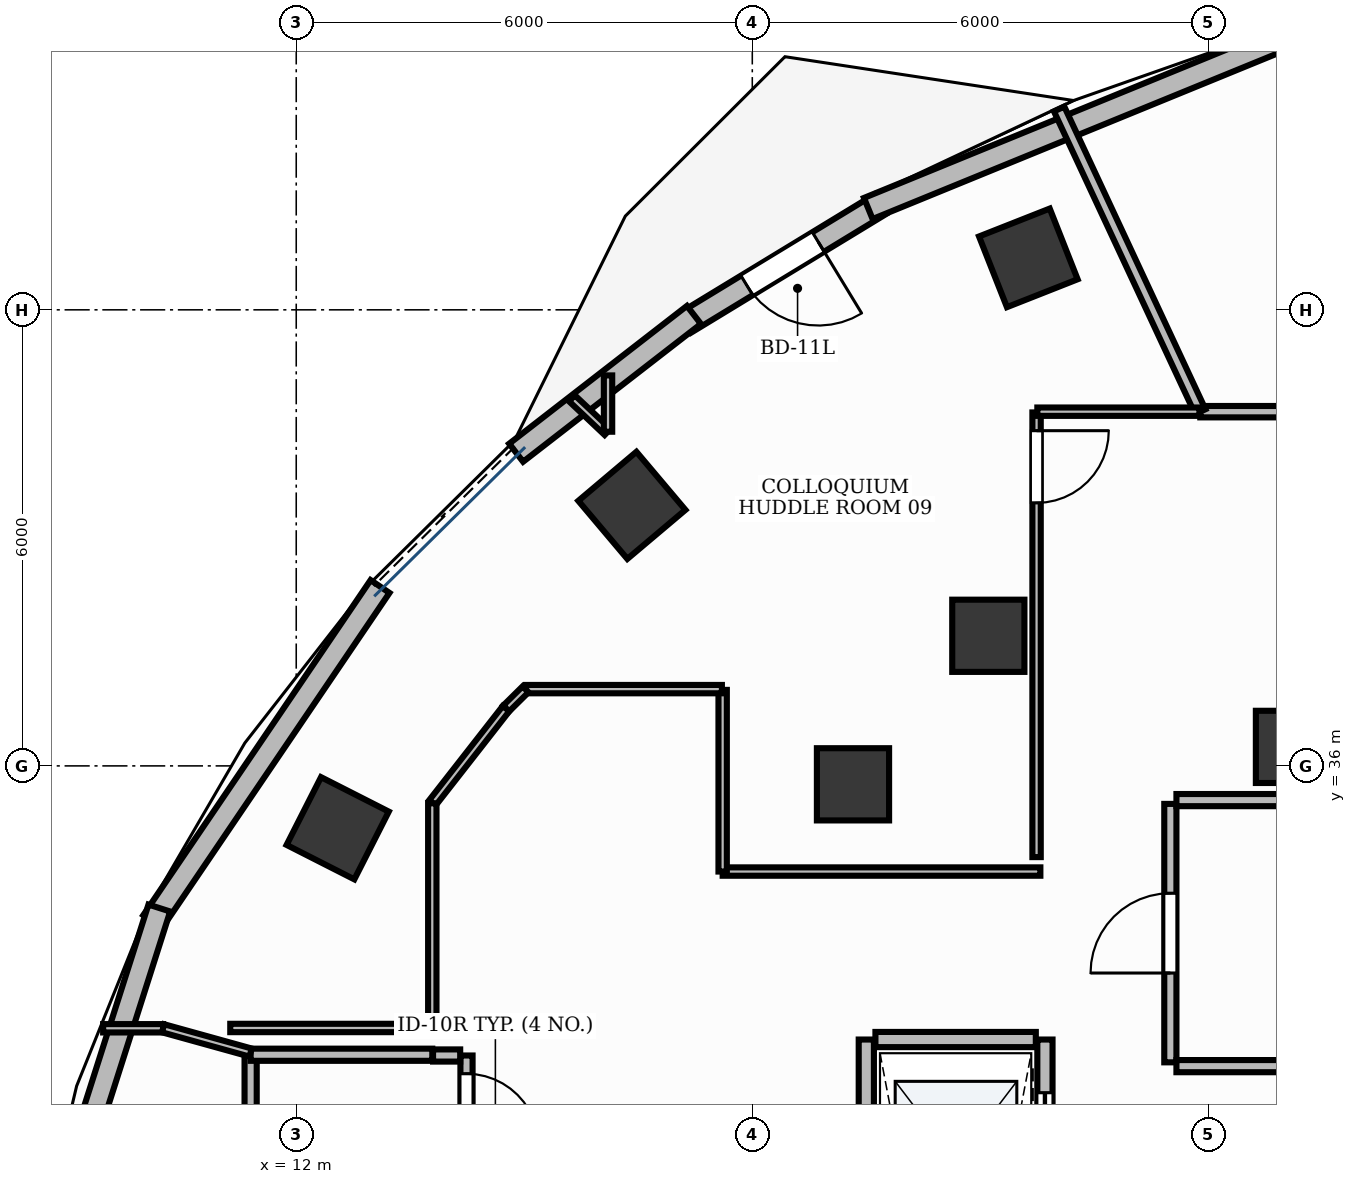
"""IFC4 building model, lengths in metres.
Left out: names, types, materials, properties, quantities, classifications, styles, units other than length and angle.
Written with IfcOpenShell. Run it as: python <this file> out.ifc"""

import sys

from ifc_helpers import new_model, si_unit, direction, frame, frame_2d, origin, origin_2d, place, context, subcontext, project, spatial, rectangle, extrude, element, fill, save


model = new_model("IFC4")
c1 = context("Model", 3, precision=1e-05, world=origin(), true_north=direction((0.0, 1.0)))
c2 = subcontext(c1, "Body", "Model", "MODEL_VIEW")
j1 = project(units=[si_unit("LENGTHUNIT", "METRE"), si_unit("PLANEANGLEUNIT", "RADIAN")], contexts=[c1])
p1 = place(None, origin())
s1 = spatial("IfcSite", under=j1, at=p1, CompositionType="ELEMENT")
p2 = place(p1, origin())
s2 = spatial("IfcBuilding", under=s1, at=p2, CompositionType="ELEMENT")
p3 = place(p2, frame((0.0, 0.0, 208.8)))
s3 = spatial("IfcBuildingStorey", under=s2, at=p3, CompositionType="ELEMENT", Elevation=208.8)
p4 = place(p3, frame((25.1, 36.25, -0.0), z_axis=(0.0, 0.0, 1.0), x_axis=(1.0, 0.0, 0.0)))
e1 = element("IfcColumn", 1, at=p4, inside=s3, PredefinedType="PILASTER", context=c2, shape_type="SweptSolid", body=[
    extrude(rectangle(XDim=0.95, YDim=0.95, at=origin_2d()), origin(), (0.0, 0.0, 1.0), 3.881),
])
for number, where, z_axis, x_axis in (
    (2, (21.632, 42.684, -0.0), (0.0, 0.0, 1.0), (0.93, 0.367, 0.0)),
    (3, (16.416, 39.427, -0.0), (0.0, 0.0, 1.0), (0.764, 0.645, 0.0)),
):
    element("IfcColumn", number, at=place(p3, frame(where, z_axis=z_axis, x_axis=x_axis)), inside=s3, PredefinedType="COLUMN", context=c2, shape_type="SweptSolid", body=[
        extrude(rectangle(XDim=1.0, YDim=1.0, at=origin_2d()), origin(), (0.0, 0.0, 1.0), 3.881),
    ])
p5 = place(p3, frame((21.105, 37.712, -0.0), z_axis=(0.0, 0.0, 1.0), x_axis=(1.0, 0.0, 0.0)))
e4 = element("IfcColumn", 4, at=p5, inside=s3, PredefinedType="COLUMN", context=c2, shape_type="SweptSolid", body=[
    extrude(rectangle(XDim=0.95, YDim=0.95, at=origin_2d()), origin(), (0.0, 0.0, 1.0), 3.881),
])
p6 = place(p3, frame((12.545, 35.18, -0.0), z_axis=(0.0, 0.0, 1.0), x_axis=(0.453057191132, 0.891481453292, 0.0)))
e5 = element("IfcColumn", 5, at=p6, inside=s3, PredefinedType="COLUMN", context=c2, shape_type="SweptSolid", body=[
    extrude(rectangle(XDim=1.0, YDim=1.0, at=origin_2d()), origin(), (0.0, 0.0, 1.0), 3.881),
])
p7 = place(p3, frame((19.325, 35.758, -0.0), z_axis=(0.0, 0.0, 1.0), x_axis=(1.0, 0.0, 0.0)))
e6 = element("IfcColumn", 6, at=p7, inside=s3, PredefinedType="COLUMN", context=c2, shape_type="SweptSolid", body=[
    extrude(rectangle(XDim=0.95, YDim=0.95, at=origin_2d()), origin(), (0.0, 0.0, 1.0), 3.881),
])
p8 = place(p3, frame((19.681, 43.388, 0.0), z_axis=(0.0, 0.0, 1.0), x_axis=(-0.854364873812, -0.519673611411, 0.0)))
e7 = element("IfcWall", 7, at=p8, inside=s3, PredefinedType="STANDARD", context=c2, shape_type="SweptSolid", body=[
    extrude(rectangle(XDim=3.004, YDim=0.3, at=frame_2d((1.502, 0.0))), origin(), (0.0, 0.0, 1.0), 3.88),
])
p9 = place(p8, frame((0.952, 0.0, 0.0)))
e8 = element("IfcOpeningElement", 8, at=p9, cuts=e7, PredefinedType="OPENING", context=c2, shape_type="SweptSolid", body=[
    extrude(rectangle(XDim=1.1, YDim=2.15, at=frame_2d((0.55, 1.075))), frame((0.0, 0.165, 0.0), z_axis=(0.0, -1.0, 0.0), x_axis=(1.0, 0.0, 0.0)), (0.0, 0.0, 1.0), 0.33),
])
p10 = place(p3, frame((25.21, 45.658, 0.0), z_axis=(0.0, 0.0, 1.0), x_axis=(-0.925564684887, -0.37858950605, 0.0)))
e9 = element("IfcWall", 9, at=p10, inside=s3, PredefinedType="STANDARD", context=c2, shape_type="SweptSolid", body=[
    extrude(rectangle(XDim=6.142, YDim=0.3, at=frame_2d((3.071, 0.0))), origin(), (0.0, 0.0, 1.0), 2.205),
])
p11 = place(p3, frame((17.232, 41.933, 0.0), z_axis=(0.0, 0.0, 1.0), x_axis=(-0.790315182738, -0.612700507536, 0.0)))
e10 = element("IfcWall", 10, at=p11, inside=s3, PredefinedType="STANDARD", context=c2, shape_type="SweptSolid", body=[
    extrude(rectangle(XDim=2.959, YDim=0.3, at=frame_2d((1.48, 0.0))), origin(), (0.0, 0.0, 1.0), 2.205),
])
p12 = place(p3, frame((13.103, 38.36, 0.0), z_axis=(0.0, 0.0, 1.0), x_axis=(-0.561387104339, -0.827553333074, 0.0)))
e11 = element("IfcWall", 11, at=p12, inside=s3, PredefinedType="STANDARD", context=c2, shape_type="SweptSolid", body=[
    extrude(rectangle(XDim=5.327, YDim=0.3, at=frame_2d((2.664, 0.0))), origin(), (0.0, 0.0, 1.0), 2.205),
])
p13 = place(p3, frame((10.198, 34.13, 0.0), z_axis=(0.0, 0.0, 1.0), x_axis=(-0.30372166002, -0.952760805887, 0.0)))
e12 = element("IfcWall", 12, at=p13, inside=s3, PredefinedType="STANDARD", context=c2, shape_type="SweptSolid", body=[
    extrude(rectangle(XDim=5.077, YDim=0.3, at=frame_2d((2.539, 0.0))), origin(), (0.0, 0.0, 1.0), 3.88),
])
p14 = place(p3, frame((19.5, 21.6, 0.0), z_axis=(0.0, 0.0, 1.0), x_axis=(0.0, 1.0, 0.0)))
e13 = element("IfcWall", 13, at=p14, inside=s3, PredefinedType="PARTITIONING", context=c2, shape_type="SweptSolid", body=[
    extrude(rectangle(XDim=10.8, YDim=0.2, at=frame_2d((5.4, 0.0))), origin(), (0.0, 0.0, 1.0), 2.22),
])
p15 = place(p3, frame((21.85, 21.6, 0.0), z_axis=(0.0, 0.0, 1.0), x_axis=(0.0, 1.0, 0.0)))
e14 = element("IfcWall", 14, at=p15, inside=s3, PredefinedType="PARTITIONING", context=c2, shape_type="SweptSolid", body=[
    extrude(rectangle(XDim=10.8, YDim=0.2, at=frame_2d((5.4, 0.0))), origin(), (0.0, 0.0, 1.0), 2.22),
])
p16 = place(p15, frame((0.9, 0.0, 0.0)))
e15 = element("IfcOpeningElement", 15, at=p16, cuts=e14, PredefinedType="OPENING", context=c2, shape_type="SweptSolid", body=[
    extrude(rectangle(XDim=1.1, YDim=2.2, at=frame_2d((0.55, 1.1))), frame((0.0, 0.115, 0.0), z_axis=(0.0, -1.0, 0.0), x_axis=(1.0, 0.0, 0.0)), (0.0, 0.0, 1.0), 0.23),
])
p17 = place(p15, frame((3.6, 0.0, 0.0)))
e16 = element("IfcOpeningElement", 16, at=p17, cuts=e14, PredefinedType="OPENING", context=c2, shape_type="SweptSolid", body=[
    extrude(rectangle(XDim=1.1, YDim=2.2, at=frame_2d((0.55, 1.1))), frame((0.0, 0.115, 0.0), z_axis=(0.0, -1.0, 0.0), x_axis=(1.0, 0.0, 0.0)), (0.0, 0.0, 1.0), 0.23),
])
p18 = place(p15, frame((6.3, 0.0, 0.0)))
e17 = element("IfcOpeningElement", 17, at=p18, cuts=e14, PredefinedType="OPENING", context=c2, shape_type="SweptSolid", body=[
    extrude(rectangle(XDim=1.1, YDim=2.2, at=frame_2d((0.55, 1.1))), frame((0.0, 0.115, 0.0), z_axis=(0.0, -1.0, 0.0), x_axis=(1.0, 0.0, 0.0)), (0.0, 0.0, 1.0), 0.23),
])
p19 = place(p15, frame((9.0, 0.0, 0.0)))
e18 = element("IfcOpeningElement", 18, at=p19, cuts=e14, PredefinedType="OPENING", context=c2, shape_type="SweptSolid", body=[
    extrude(rectangle(XDim=1.1, YDim=2.2, at=frame_2d((0.55, 1.1))), frame((0.0, 0.115, 0.0), z_axis=(0.0, -1.0, 0.0), x_axis=(1.0, 0.0, 0.0)), (0.0, 0.0, 1.0), 0.23),
])
p20 = place(p3, frame((19.62, 32.4, 0.0), z_axis=(0.0, 0.0, 1.0), x_axis=(1.0, 0.0, 0.0)))
e19 = element("IfcWall", 19, at=p20, inside=s3, PredefinedType="PARTITIONING", context=c2, shape_type="SweptSolid", body=[
    extrude(rectangle(XDim=2.11, YDim=0.2, at=frame_2d((1.055, 0.0))), origin(), (0.0, 0.0, 1.0), 2.22),
])
p21 = place(p3, frame((23.5, 32.1, 0.0), z_axis=(0.0, 0.0, 1.0), x_axis=(0.0, 1.0, 0.0)))
e20 = element("IfcWall", 20, at=p21, inside=s3, PredefinedType="PARTITIONING", context=c2, shape_type="SweptSolid", body=[
    extrude(rectangle(XDim=3.4, YDim=0.16, at=frame_2d((1.7, 0.0))), origin(), (0.0, 0.0, 1.0), 2.22),
])
p22 = place(p21, frame((1.175, 0.0, 0.0)))
e21 = element("IfcOpeningElement", 21, at=p22, cuts=e20, PredefinedType="OPENING", context=c2, shape_type="SweptSolid", body=[
    extrude(rectangle(XDim=1.05, YDim=2.15, at=frame_2d((0.525, 1.075))), frame((0.0, 0.095, 0.0), z_axis=(0.0, -1.0, 0.0), x_axis=(1.0, 0.0, 0.0)), (0.0, 0.0, 1.0), 0.19),
])
p23 = place(p3, frame((23.58, 32.05, 0.0), z_axis=(0.0, 0.0, 1.0), x_axis=(1.0, 0.0, 0.0)))
e22 = element("IfcWall", 22, at=p23, inside=s3, PredefinedType="PARTITIONING", context=c2, shape_type="SweptSolid", body=[
    extrude(rectangle(XDim=4.97, YDim=0.16, at=frame_2d((2.485, 0.0))), origin(), (0.0, 0.0, 1.0), 2.22),
])
p24 = place(p3, frame((23.58, 35.55, 0.0), z_axis=(0.0, 0.0, 1.0), x_axis=(1.0, 0.0, 0.0)))
e23 = element("IfcWall", 23, at=p24, inside=s3, PredefinedType="PARTITIONING", context=c2, shape_type="SweptSolid", body=[
    extrude(rectangle(XDim=2.12, YDim=0.16, at=frame_2d((1.06, 0.0))), origin(), (0.0, 0.0, 1.0), 2.22),
])
p25 = place(p3, frame((14.24, 32.19, 0.0), z_axis=(0.0, 0.0, 1.0), x_axis=(0.0, -1.0, 0.0)))
e24 = element("IfcWall", 24, at=p25, inside=s3, PredefinedType="PARTITIONING", context=c2, shape_type="SweptSolid", body=[
    extrude(rectangle(XDim=4.99, YDim=0.16, at=frame_2d((2.495, 0.0))), origin(), (0.0, 0.0, 1.0), 2.22),
])
p26 = place(p25, frame((0.24, 0.0, 0.0)))
e25 = element("IfcOpeningElement", 25, at=p26, cuts=e24, PredefinedType="OPENING", context=c2, shape_type="SweptSolid", body=[
    extrude(rectangle(XDim=0.95, YDim=2.15, at=frame_2d((0.475, 1.075))), frame((0.0, 0.095, 0.0), z_axis=(0.0, -1.0, 0.0), x_axis=(1.0, 0.0, 0.0)), (0.0, 0.0, 1.0), 0.19),
])
p27 = place(p3, frame((33.692, 40.66, 0.0), z_axis=(0.0, 0.0, 1.0), x_axis=(-1.0, 0.0, 0.0)))
e26 = element("IfcWall", 26, at=p27, inside=s3, PredefinedType="PARTITIONING", context=c2, shape_type="SweptSolid", body=[
    extrude(rectangle(XDim=9.798, YDim=0.15, at=frame_2d((4.899, 0.0))), origin(), (0.0, 0.0, 1.0), 2.22),
])
p28 = place(p27, frame((0.24, 0.0, 0.0)))
e27 = element("IfcOpeningElement", 27, at=p28, cuts=e26, PredefinedType="OPENING", context=c2, shape_type="SweptSolid", body=[
    extrude(rectangle(XDim=0.95, YDim=2.15, at=frame_2d((0.475, 1.075))), frame((0.0, 0.09, 0.0), z_axis=(0.0, -1.0, 0.0), x_axis=(1.0, 0.0, 0.0)), (0.0, 0.0, 1.0), 0.18),
])
p29 = place(p3, frame((21.74, 40.65, 0.0), z_axis=(0.0, 0.0, 1.0), x_axis=(0.0, -1.0, 0.0)))
e28 = element("IfcWall", 28, at=p29, inside=s3, PredefinedType="MOVABLE", context=c2, shape_type="SweptSolid", body=[
    extrude(rectangle(XDim=5.85, YDim=0.11, at=frame_2d((2.925, 0.0))), origin(), (0.0, 0.0, 1.0), 2.22),
])
p30 = place(p29, frame((0.24, 0.0, 0.0)))
e29 = element("IfcOpeningElement", 29, at=p30, cuts=e28, PredefinedType="OPENING", context=c2, shape_type="SweptSolid", body=[
    extrude(rectangle(XDim=0.95, YDim=2.15, at=frame_2d((0.475, 1.075))), frame((0.0, 0.07, 0.0), z_axis=(0.0, -1.0, 0.0), x_axis=(1.0, 0.0, 0.0)), (0.0, 0.0, 1.0), 0.14),
])
p31 = place(p3, frame((13.8, 32.19, 0.0), z_axis=(0.0, 0.0, 1.0), x_axis=(1.0, 0.0, 0.0)))
e30 = element("IfcWall", 30, at=p31, inside=s3, PredefinedType="PARTITIONING", context=c2, shape_type="SweptSolid", body=[
    extrude(rectangle(XDim=0.357, YDim=0.16, at=frame_2d((0.178, 0.0))), origin(), (0.0, 0.0, 1.0), 2.22),
])
p32 = place(p3, frame((11.4, 27.2, 0.0), z_axis=(0.0, 0.0, 1.0), x_axis=(0.0, 1.0, 0.0)))
e31 = element("IfcWall", 31, at=p32, inside=s3, PredefinedType="PARTITIONING", context=c2, shape_type="SweptSolid", body=[
    extrude(rectangle(XDim=5.0, YDim=0.16, at=frame_2d((2.5, 0.0))), origin(), (0.0, 0.0, 1.0), 2.22),
])
p33 = place(p3, frame((11.4, 32.2, 0.0), z_axis=(0.0, 0.0, 1.0), x_axis=(1.0, 0.0, 0.0)))
e32 = element("IfcWall", 32, at=p33, inside=s3, PredefinedType="PARTITIONING", context=c2, shape_type="SweptSolid", body=[
    extrude(rectangle(XDim=2.39, YDim=0.16, at=frame_2d((1.195, 0.0))), origin(), (0.0, 0.0, 1.0), 2.22),
])
p34 = place(p3, frame((9.46, 32.548, 0.0), z_axis=(0.0, 0.0, 1.0), x_axis=(1.0, 0.0, 0.0)))
e33 = element("IfcWall", 33, at=p34, inside=s3, PredefinedType="MOVABLE", context=c2, shape_type="SweptSolid", body=[
    extrude(rectangle(XDim=0.789, YDim=0.11, at=frame_2d((0.394, 0.0))), origin(), (0.0, 0.0, 1.0), 2.22),
])
p35 = place(p3, frame((10.249, 32.548, 0.0), z_axis=(0.0, 0.0, 1.0), x_axis=(0.963570580791, -0.267454175203, 0.0)))
e34 = element("IfcWall", 34, at=p35, inside=s3, PredefinedType="MOVABLE", context=c2, shape_type="SweptSolid", body=[
    extrude(rectangle(XDim=1.195, YDim=0.11, at=frame_2d((0.597, 0.0))), origin(), (0.0, 0.0, 1.0), 2.22),
])
p36 = place(p3, frame((23.894, 40.66, 0.0), z_axis=(0.0, 0.0, 1.0), x_axis=(-0.422620807898, 0.90630659974, 0.0)))
e35 = element("IfcWall", 35, at=p36, inside=s3, PredefinedType="PARTITIONING", context=c2, shape_type="SweptSolid", body=[
    extrude(rectangle(XDim=4.394, YDim=0.15, at=frame_2d((2.197, 0.0))), origin(), (0.0, 0.0, 1.0), 2.22),
])
p37 = place(p3, frame((15.627, 40.836, 0.0), z_axis=(0.0, 0.0, 1.0), x_axis=(0.726519497239, -0.687145850698, 0.0)))
e36 = element("IfcWall", 36, at=p37, inside=s3, PredefinedType="MOVABLE", context=c2, shape_type="SweptSolid", body=[
    extrude(rectangle(XDim=0.645, YDim=0.11, at=frame_2d((0.322, 0.0))), origin(), (0.0, 0.0, 1.0), 2.22),
])
p38 = place(p3, frame((16.102, 40.396, 0.0), z_axis=(0.0, 0.0, 1.0), x_axis=(0.0, 1.0, 0.0)))
e37 = element("IfcWall", 37, at=p38, inside=s3, PredefinedType="MOVABLE", context=c2, shape_type="SweptSolid", body=[
    extrude(rectangle(XDim=0.741, YDim=0.11, at=frame_2d((0.371, 0.0))), origin(), (0.0, 0.0, 1.0), 2.22),
])
p39 = place(p3, frame((23.883, 40.66, 0.0), z_axis=(0.0, 0.0, 1.0), x_axis=(-1.0, 0.0, 0.0)))
e38 = element("IfcWall", 38, at=p39, inside=s3, PredefinedType="MOVABLE", context=c2, shape_type="SweptSolid", body=[
    extrude(rectangle(XDim=2.133, YDim=0.11, at=frame_2d((1.066, 0.0))), origin(), (0.0, 0.0, 1.0), 2.22),
])
p40 = place(p3, frame((21.79, 34.61, 0.0), z_axis=(0.0, 0.0, 1.0), x_axis=(-1.0, 0.0, 0.0)))
e39 = element("IfcWall", 39, at=p40, inside=s3, PredefinedType="MOVABLE", context=c2, shape_type="SweptSolid", body=[
    extrude(rectangle(XDim=4.18, YDim=0.11, at=frame_2d((2.09, 0.0))), origin(), (0.0, 0.0, 1.0), 2.22),
])
p41 = place(p3, frame((17.61, 34.61, 0.0), z_axis=(0.0, 0.0, 1.0), x_axis=(0.0, 1.0, 0.0)))
e40 = element("IfcWall", 40, at=p41, inside=s3, PredefinedType="MOVABLE", context=c2, shape_type="SweptSolid", body=[
    extrude(rectangle(XDim=2.39, YDim=0.11, at=frame_2d((1.195, 0.0))), origin(), (0.0, 0.0, 1.0), 2.22),
])
p42 = place(p3, frame((17.6, 37.01, 0.0), z_axis=(0.0, 0.0, 1.0), x_axis=(-1.0, 0.0, 0.0)))
e41 = element("IfcWall", 41, at=p42, inside=s3, PredefinedType="MOVABLE", context=c2, shape_type="SweptSolid", body=[
    extrude(rectangle(XDim=2.576, YDim=0.11, at=frame_2d((1.288, 0.0))), origin(), (0.0, 0.0, 1.0), 2.22),
])
p43 = place(p3, frame((15.017, 37.007, 0.0), z_axis=(0.0, 0.0, 1.0), x_axis=(-0.711174408111, -0.70301561949, 0.0)))
e42 = element("IfcWall", 42, at=p43, inside=s3, PredefinedType="MOVABLE", context=c2, shape_type="SweptSolid", body=[
    extrude(rectangle(XDim=0.359, YDim=0.11, at=frame_2d((0.18, 0.0))), origin(), (0.0, 0.0, 1.0), 2.22),
])
p44 = place(p3, frame((14.76, 36.754, 0.0), z_axis=(0.0, 0.0, 1.0), x_axis=(-0.615625972761, -0.788038489962, 0.0)))
e43 = element("IfcWall", 43, at=p44, inside=s3, PredefinedType="MOVABLE", context=c2, shape_type="SweptSolid", body=[
    extrude(rectangle(XDim=1.573, YDim=0.11, at=frame_2d((0.787, 0.0))), origin(), (0.0, 0.0, 1.0), 2.22),
])
p45 = place(p3, frame((13.79, 35.508, 0.0), z_axis=(0.0, 0.0, 1.0), x_axis=(0.0, -1.0, 0.0)))
e44 = element("IfcWall", 44, at=p45, inside=s3, PredefinedType="MOVABLE", context=c2, shape_type="SweptSolid", body=[
    extrude(rectangle(XDim=2.956, YDim=0.11, at=frame_2d((1.478, 0.0))), origin(), (0.0, 0.0, 1.0), 2.22),
])
p46 = place(p3, frame((13.79, 32.552, 0.0), z_axis=(0.0, 0.0, 1.0), x_axis=(-1.0, 0.0, 0.0)))
e45 = element("IfcWall", 45, at=p46, inside=s3, PredefinedType="MOVABLE", context=c2, shape_type="SweptSolid", body=[
    extrude(rectangle(XDim=2.658, YDim=0.11, at=frame_2d((1.329, 0.0))), origin(), (0.0, 0.0, 1.0), 2.22),
])
p47 = place(p9, origin())
e46 = element("IfcDoor", 46, at=p47, inside=s3, OperationType="SINGLE_SWING_LEFT", PredefinedType="DOOR", context=c2, shape_type="SweptSolid", body=[
    extrude(rectangle(XDim=1.1, YDim=2.15, at=frame_2d((0.55, 1.075))), frame((0.0, 0.025, 0.0), z_axis=(0.0, -1.0, 0.0), x_axis=(1.0, 0.0, 0.0)), (0.0, 0.0, 1.0), 0.05),
])
fill(e8, e46)
p48 = place(p19, origin())
e47 = element("IfcDoor", 47, at=p48, inside=s3, OperationType="DOUBLE_DOOR_SLIDING", PredefinedType="DOOR", context=c2, shape_type="SweptSolid", body=[
    extrude(rectangle(XDim=1.1, YDim=2.2, at=frame_2d((0.55, 1.1))), frame((0.0, 0.025, 0.0), z_axis=(0.0, -1.0, 0.0), x_axis=(1.0, 0.0, 0.0)), (0.0, 0.0, 1.0), 0.05),
])
fill(e18, e47)
p49 = place(p22, origin())
e48 = element("IfcDoor", 48, at=p49, inside=s3, OperationType="SINGLE_SWING_LEFT", PredefinedType="DOOR", context=c2, shape_type="SweptSolid", body=[
    extrude(rectangle(XDim=1.05, YDim=2.15, at=frame_2d((0.525, 1.075))), frame((0.0, 0.025, 0.0), z_axis=(0.0, -1.0, 0.0), x_axis=(1.0, 0.0, 0.0)), (0.0, 0.0, 1.0), 0.05),
])
fill(e21, e48)
p50 = place(p26, origin())
e49 = element("IfcDoor", 49, at=p50, inside=s3, OperationType="SINGLE_SWING_RIGHT", PredefinedType="DOOR", context=c2, shape_type="SweptSolid", body=[
    extrude(rectangle(XDim=0.95, YDim=2.15, at=frame_2d((0.475, 1.075))), frame((0.0, 0.025, 0.0), z_axis=(0.0, -1.0, 0.0), x_axis=(1.0, 0.0, 0.0)), (0.0, 0.0, 1.0), 0.05),
])
fill(e25, e49)
p51 = place(p30, origin())
e50 = element("IfcDoor", 50, at=p51, inside=s3, OperationType="SINGLE_SWING_LEFT", PredefinedType="DOOR", context=c2, shape_type="SweptSolid", body=[
    extrude(rectangle(XDim=0.95, YDim=2.15, at=frame_2d((0.475, 1.075))), frame((0.0, 0.025, 0.0), z_axis=(0.0, -1.0, 0.0), x_axis=(1.0, 0.0, 0.0)), (0.0, 0.0, 1.0), 0.05),
])
fill(e29, e50)
save(model, sys.argv[1])
